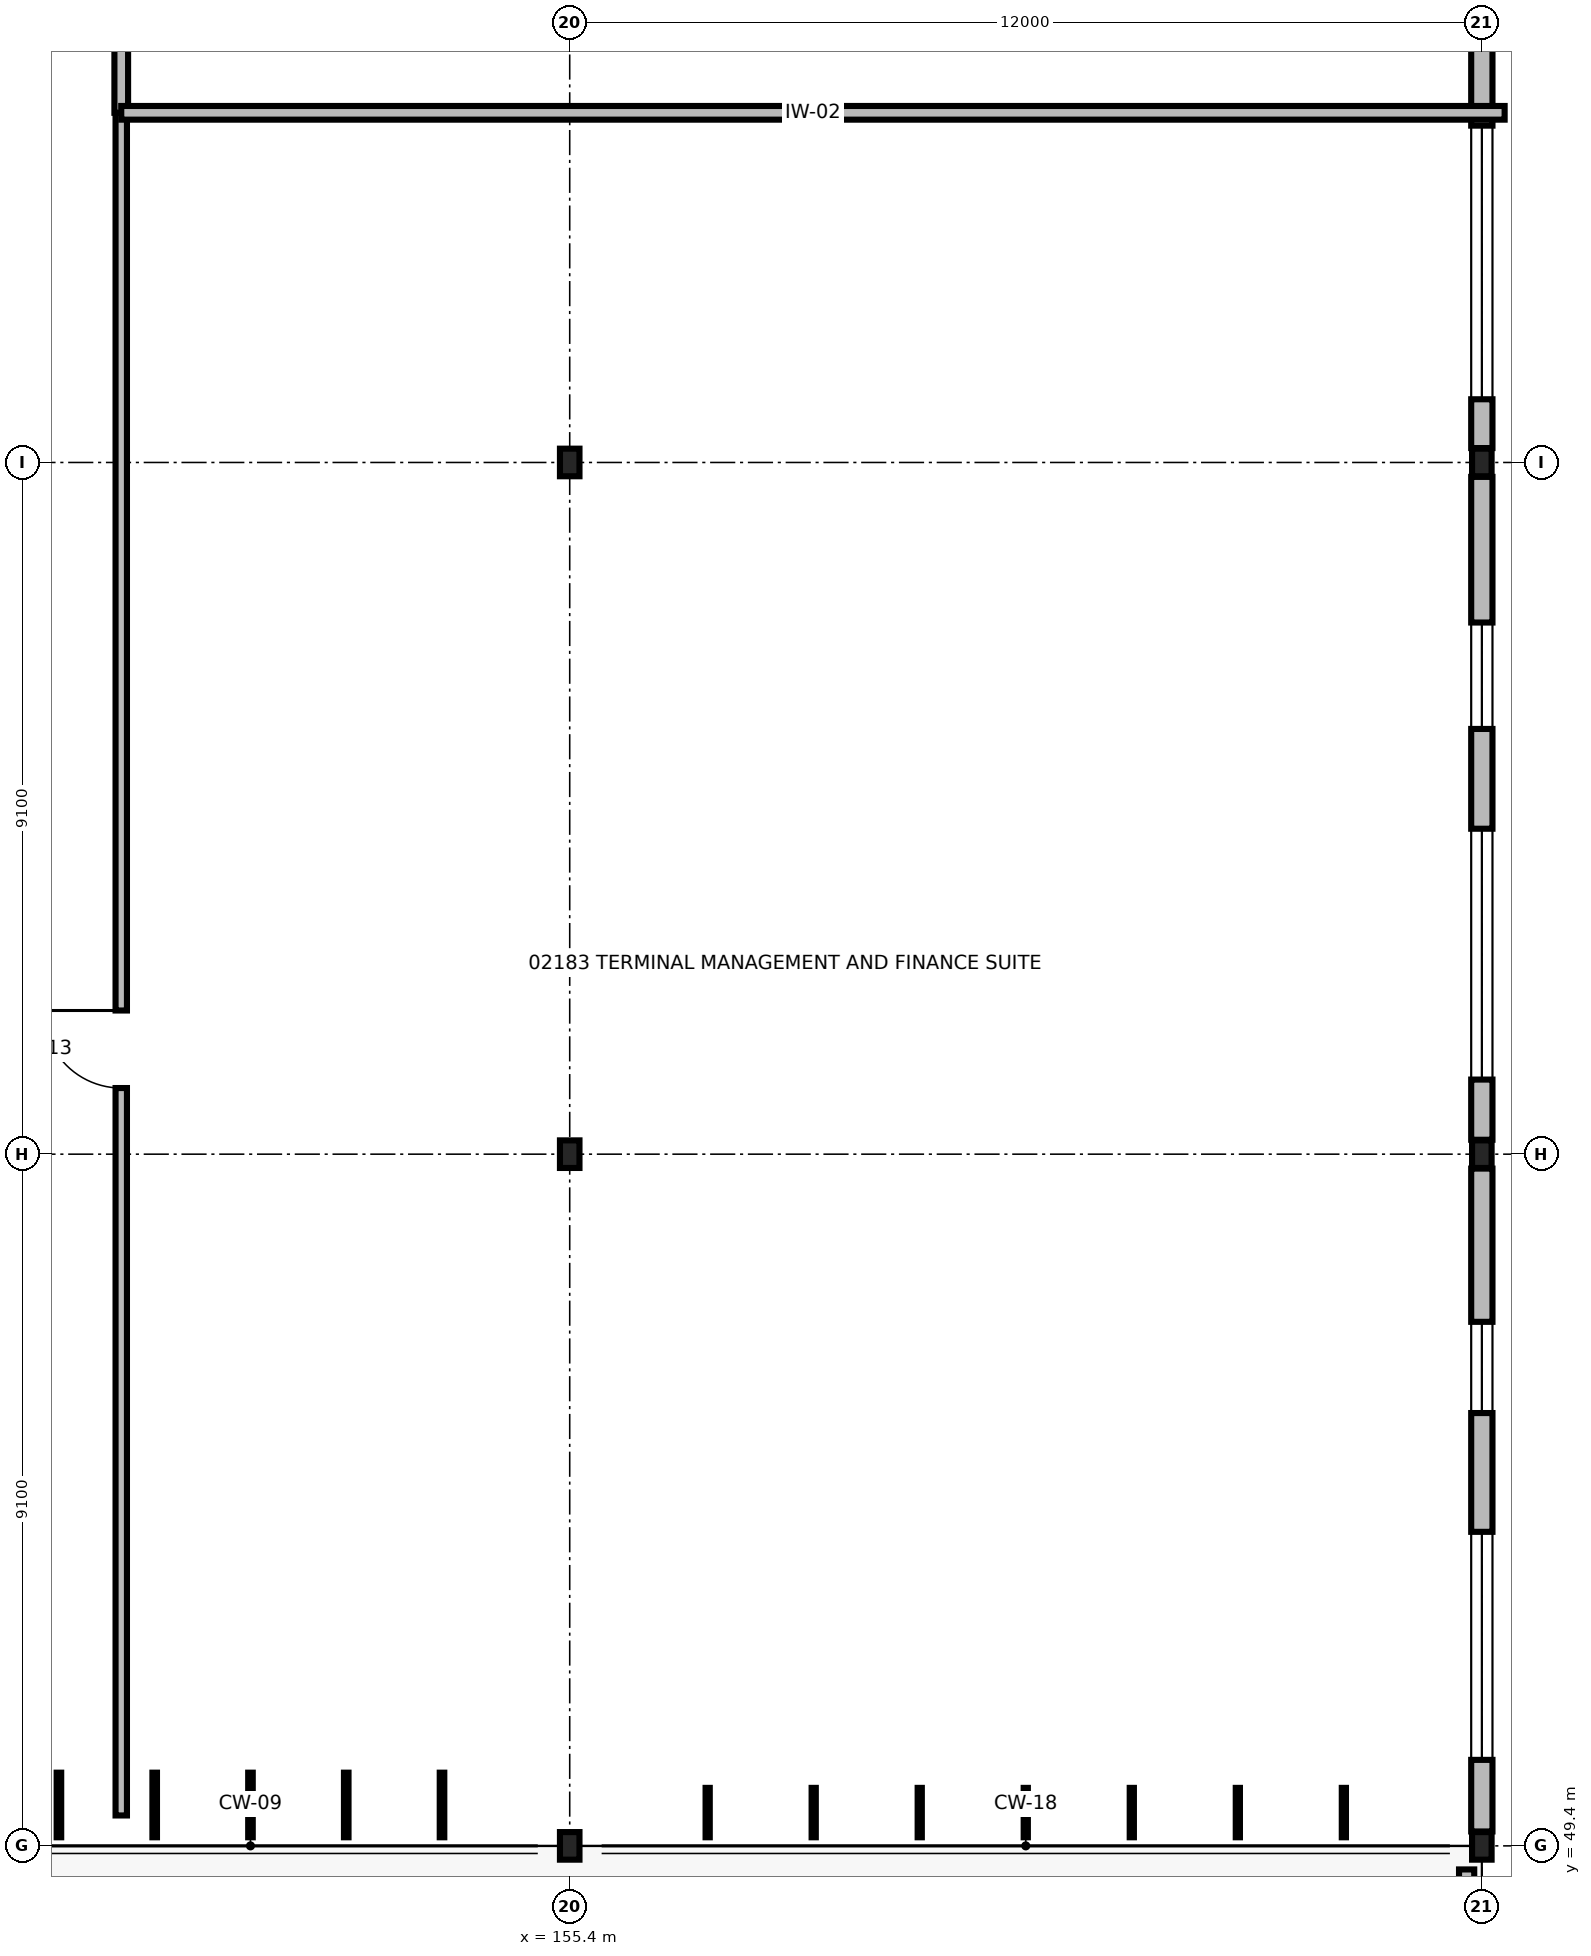
"""IFC4 building model, lengths in metres.
Left out: names, types, materials, properties, quantities, classifications, styles, units other than length and angle.
Written with IfcOpenShell. Run it as: python <this file> out.ifc"""

import sys

from ifc_helpers import new_model, si_unit, direction, frame, frame_2d, origin, origin_2d, place, context, subcontext, project, spatial, rectangle, i_section, extrude, element, fill, save


model = new_model("IFC4")
c1 = context("Model", 3, precision=1e-05, world=origin(), true_north=direction((0.0, 1.0)))
c2 = subcontext(c1, "Body", "Model", "MODEL_VIEW")
j1 = project(units=[si_unit("LENGTHUNIT", "METRE"), si_unit("PLANEANGLEUNIT", "RADIAN")], contexts=[c1])
p1 = place(None, origin())
s1 = spatial("IfcSite", under=j1, at=p1, CompositionType="ELEMENT")
p2 = place(p1, origin())
s2 = spatial("IfcBuilding", under=s1, at=p2, CompositionType="ELEMENT")
p3 = place(p2, frame((0.0, 0.0, 9.6)))
s3 = spatial("IfcBuildingStorey", under=s2, at=p3, CompositionType="ELEMENT", Elevation=9.6)
for number, where, z_axis, x_axis in (
    (1, (155.4, 49.4, 0.0), (0.0, 0.0, 1.0), (1.0, 0.0, 0.0)),
    (2, (155.4, 58.5, 0.0), (0.0, 0.0, 1.0), (1.0, 0.0, 0.0)),
    (3, (155.4, 67.6, 0.0), (0.0, 0.0, 1.0), (1.0, 0.0, 0.0)),
    (4, (167.4, 49.4, 0.0), (0.0, 0.0, 1.0), (1.0, 0.0, 0.0)),
    (5, (167.4, 58.5, 0.0), (0.0, 0.0, 1.0), (1.0, 0.0, 0.0)),
    (6, (167.4, 67.6, 0.0), (0.0, 0.0, 1.0), (1.0, 0.0, 0.0)),
):
    element("IfcColumn", number, at=place(p3, frame(where, z_axis=z_axis, x_axis=x_axis)), inside=s3, PredefinedType="COLUMN", context=c2, shape_type="SweptSolid", body=[
        extrude(i_section(OverallWidth=0.257, OverallDepth=0.363, WebThickness=0.013, FlangeThickness=0.022, at=origin_2d()), origin(), (0.0, 0.0, 1.0), 4.2),
    ])
p4 = place(p3, frame((167.4, 58.311, 0.0), z_axis=(0.0, 0.0, 1.0), x_axis=(0.0, -1.0, 0.0)))
e7 = element("IfcWall", 7, at=p4, inside=s3, PredefinedType="SOLIDWALL", context=c2, shape_type="SweptSolid", body=[
    extrude(rectangle(XDim=8.721, YDim=0.28, at=frame_2d((4.36, 0.0))), origin(), (0.0, 0.0, 1.0), 3.242),
])
p5 = place(p4, frame((2.016, 0.0, 0.95)))
e8 = element("IfcOpeningElement", 8, at=p5, cuts=e7, PredefinedType="OPENING", context=c2, shape_type="SweptSolid", body=[
    extrude(rectangle(XDim=1.2, YDim=1.75, at=frame_2d((0.6, 0.875))), frame((0.0, 0.15, 0.0), z_axis=(0.0, -1.0, 0.0), x_axis=(1.0, 0.0, 0.0)), (0.0, 0.0, 1.0), 0.3),
])
p6 = place(p4, frame((4.779, 0.0, 0.95)))
e9 = element("IfcOpeningElement", 9, at=p6, cuts=e7, PredefinedType="OPENING", context=c2, shape_type="SweptSolid", body=[
    extrude(rectangle(XDim=3.0, YDim=2.05, at=frame_2d((1.5, 1.025))), frame((0.0, 0.15, 0.0), z_axis=(0.0, -1.0, 0.0), x_axis=(1.0, 0.0, 0.0)), (0.0, 0.0, 1.0), 0.3),
])
p7 = place(p3, frame((167.4, 67.41, 0.0), z_axis=(0.0, 0.0, 1.0), x_axis=(0.0, -1.0, 0.0)))
e10 = element("IfcWall", 10, at=p7, inside=s3, PredefinedType="SOLIDWALL", context=c2, shape_type="SweptSolid", body=[
    extrude(rectangle(XDim=8.721, YDim=0.28, at=frame_2d((4.36, 0.0))), origin(), (0.0, 0.0, 1.0), 3.242),
])
p8 = place(p7, frame((1.916, 0.0, 0.95)))
e11 = element("IfcOpeningElement", 11, at=p8, cuts=e10, PredefinedType="OPENING", context=c2, shape_type="SweptSolid", body=[
    extrude(rectangle(XDim=1.4, YDim=1.75, at=frame_2d((0.7, 0.875))), frame((0.0, 0.15, 0.0), z_axis=(0.0, -1.0, 0.0), x_axis=(1.0, 0.0, 0.0)), (0.0, 0.0, 1.0), 0.3),
])
p9 = place(p7, frame((4.629, 0.0, 0.95)))
e12 = element("IfcOpeningElement", 12, at=p9, cuts=e10, PredefinedType="OPENING", context=c2, shape_type="SweptSolid", body=[
    extrude(rectangle(XDim=3.3, YDim=2.05, at=frame_2d((1.65, 1.025))), frame((0.0, 0.15, 0.0), z_axis=(0.0, -1.0, 0.0), x_axis=(1.0, 0.0, 0.0)), (0.0, 0.0, 1.0), 0.3),
])
p10 = place(p3, frame((167.4, 76.51, 0.0), z_axis=(0.0, 0.0, 1.0), x_axis=(0.0, -1.0, 0.0)))
e13 = element("IfcWall", 13, at=p10, inside=s3, PredefinedType="SOLIDWALL", context=c2, shape_type="SweptSolid", body=[
    extrude(rectangle(XDim=8.721, YDim=0.28, at=frame_2d((4.36, 0.0))), origin(), (0.0, 0.0, 1.0), 3.242),
])
p11 = place(p10, frame((1.816, 0.0, 0.95)))
e14 = element("IfcOpeningElement", 14, at=p11, cuts=e13, PredefinedType="OPENING", context=c2, shape_type="SweptSolid", body=[
    extrude(rectangle(XDim=1.6, YDim=1.75, at=frame_2d((0.8, 0.875))), frame((0.0, 0.15, 0.0), z_axis=(0.0, -1.0, 0.0), x_axis=(1.0, 0.0, 0.0)), (0.0, 0.0, 1.0), 0.3),
])
p12 = place(p10, frame((4.479, 0.0, 0.95)))
e15 = element("IfcOpeningElement", 15, at=p12, cuts=e13, PredefinedType="OPENING", context=c2, shape_type="SweptSolid", body=[
    extrude(rectangle(XDim=3.6, YDim=2.05, at=frame_2d((1.8, 1.025))), frame((0.0, 0.15, 0.0), z_axis=(0.0, -1.0, 0.0), x_axis=(1.0, 0.0, 0.0)), (0.0, 0.0, 1.0), 0.3),
])
p13 = place(p3, frame((167.2, 25.51, 0.0), z_axis=(0.0, 0.0, 1.0), x_axis=(0.0, 1.0, 0.0)))
e16 = element("IfcWall", 16, at=p13, inside=s3, PredefinedType="PARAPET", context=c2, shape_type="SweptSolid", body=[
    extrude(rectangle(XDim=23.58, YDim=0.2, at=frame_2d((11.79, 0.0))), origin(), (0.0, 0.0, 1.0), 1.12),
])
p14 = place(p3, frame((149.5, 49.8, 0.0), z_axis=(0.0, 0.0, 1.0), x_axis=(0.0, 1.0, 0.0)))
e17 = element("IfcWall", 17, at=p14, inside=s3, PredefinedType="PARTITIONING", context=c2, shape_type="SweptSolid", body=[
    extrude(rectangle(XDim=22.4, YDim=0.15, at=frame_2d((11.2, 0.0))), origin(), (0.0, 0.0, 1.0), 3.323),
])
p15 = place(p14, frame((9.57, 0.0, 0.0)))
e18 = element("IfcOpeningElement", 18, at=p15, cuts=e17, PredefinedType="OPENING", context=c2, shape_type="SweptSolid", body=[
    extrude(rectangle(XDim=1.02, YDim=2.2, at=frame_2d((0.51, 1.1))), frame((0.0, 0.085, 0.0), z_axis=(0.0, -1.0, 0.0), x_axis=(1.0, 0.0, 0.0)), (0.0, 0.0, 1.0), 0.17),
])
p16 = place(p3, frame((149.5, 72.2, 0.0), z_axis=(0.0, 0.0, 1.0), x_axis=(0.0, 1.0, 0.0)))
e19 = element("IfcWall", 19, at=p16, inside=s3, PredefinedType="PARTITIONING", context=c2, shape_type="SweptSolid", body=[
    extrude(rectangle(XDim=22.76, YDim=0.18, at=frame_2d((11.38, 0.0))), origin(), (0.0, 0.0, 1.0), 3.323),
])
p17 = place(p16, frame((10.63, 0.0, 0.0)))
e20 = element("IfcOpeningElement", 20, at=p17, cuts=e19, PredefinedType="OPENING", context=c2, shape_type="SweptSolid", body=[
    extrude(rectangle(XDim=1.5, YDim=2.25, at=frame_2d((0.75, 1.125))), frame((0.0, 0.1, 0.0), z_axis=(0.0, -1.0, 0.0), x_axis=(1.0, 0.0, 0.0)), (0.0, 0.0, 1.0), 0.2),
])
p18 = place(p3, frame((149.5, 72.2, 0.0), z_axis=(0.0, 0.0, 1.0), x_axis=(1.0, 0.0, 0.0)))
e21 = element("IfcWall", 21, at=p18, inside=s3, PredefinedType="PARTITIONING", context=c2, shape_type="SweptSolid", body=[
    extrude(rectangle(XDim=18.2, YDim=0.18, at=frame_2d((9.1, 0.0))), origin(), (0.0, 0.0, 1.0), 3.242),
])
p19 = place(p5, origin())
e22 = element("IfcWindow", 22, at=p19, inside=s3, PartitioningType="SINGLE_PANEL", PredefinedType="WINDOW", context=c2, shape_type="SweptSolid", body=[
    extrude(rectangle(XDim=1.2, YDim=1.75, at=frame_2d((0.6, 0.875))), frame((0.0, 0.03, 0.0), z_axis=(0.0, -1.0, 0.0), x_axis=(1.0, 0.0, 0.0)), (0.0, 0.0, 1.0), 0.06),
])
fill(e8, e22)
p20 = place(p6, origin())
e23 = element("IfcWindow", 23, at=p20, inside=s3, PartitioningType="SINGLE_PANEL", PredefinedType="WINDOW", context=c2, shape_type="SweptSolid", body=[
    extrude(rectangle(XDim=3.0, YDim=2.05, at=frame_2d((1.5, 1.025))), frame((0.0, 0.03, 0.0), z_axis=(0.0, -1.0, 0.0), x_axis=(1.0, 0.0, 0.0)), (0.0, 0.0, 1.0), 0.06),
])
fill(e9, e23)
p21 = place(p8, origin())
e24 = element("IfcWindow", 24, at=p21, inside=s3, PartitioningType="SINGLE_PANEL", PredefinedType="WINDOW", context=c2, shape_type="SweptSolid", body=[
    extrude(rectangle(XDim=1.4, YDim=1.75, at=frame_2d((0.7, 0.875))), frame((0.0, 0.03, 0.0), z_axis=(0.0, -1.0, 0.0), x_axis=(1.0, 0.0, 0.0)), (0.0, 0.0, 1.0), 0.06),
])
fill(e11, e24)
p22 = place(p9, origin())
e25 = element("IfcWindow", 25, at=p22, inside=s3, PartitioningType="SINGLE_PANEL", PredefinedType="WINDOW", context=c2, shape_type="SweptSolid", body=[
    extrude(rectangle(XDim=3.3, YDim=2.05, at=frame_2d((1.65, 1.025))), frame((0.0, 0.03, 0.0), z_axis=(0.0, -1.0, 0.0), x_axis=(1.0, 0.0, 0.0)), (0.0, 0.0, 1.0), 0.06),
])
fill(e12, e25)
p23 = place(p12, origin())
e26 = element("IfcWindow", 26, at=p23, inside=s3, PartitioningType="SINGLE_PANEL", PredefinedType="WINDOW", context=c2, shape_type="SweptSolid", body=[
    extrude(rectangle(XDim=3.6, YDim=2.05, at=frame_2d((1.8, 1.025))), frame((0.0, 0.03, 0.0), z_axis=(0.0, -1.0, 0.0), x_axis=(1.0, 0.0, 0.0)), (0.0, 0.0, 1.0), 0.06),
])
fill(e15, e26)
p24 = place(p15, frame((1.02, 0.0, 0.0), z_axis=(0.0, 0.0, 1.0), x_axis=(-1.0, 0.0, 0.0)))
e27 = element("IfcDoor", 27, at=p24, inside=s3, OperationType="SINGLE_SWING_LEFT", PredefinedType="DOOR", context=c2, shape_type="SweptSolid", body=[
    extrude(rectangle(XDim=1.02, YDim=2.2, at=frame_2d((0.51, 1.1))), frame((0.0, 0.025, 0.0), z_axis=(0.0, -1.0, 0.0), x_axis=(1.0, 0.0, 0.0)), (0.0, 0.0, 1.0), 0.05),
])
fill(e18, e27)
save(model, sys.argv[1])
